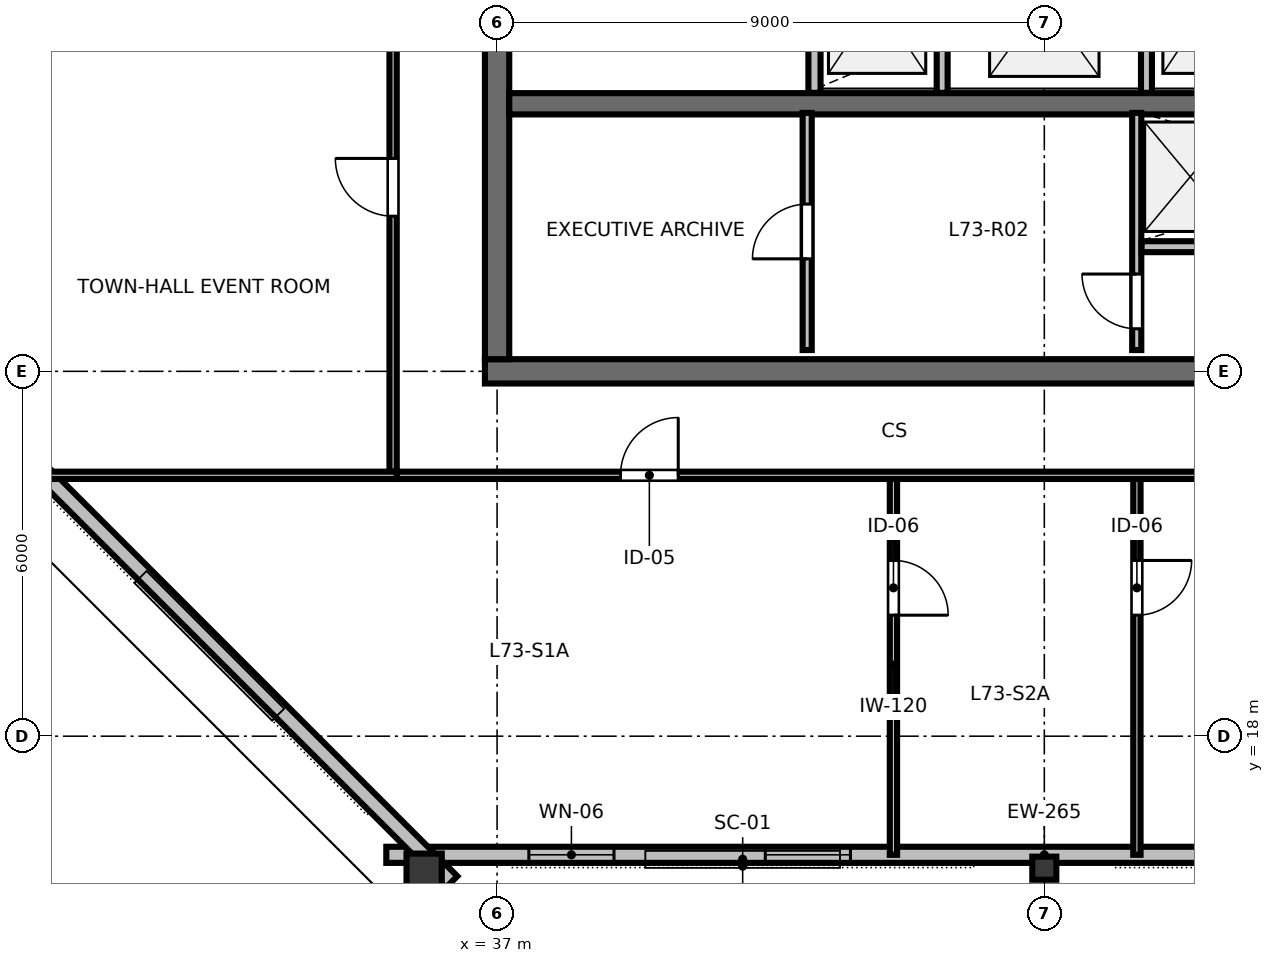
"""IFC4 building model, lengths in metres.
Left out: names, types, materials, properties, quantities, classifications, styles, units other than length and angle.
Written with IfcOpenShell. Run it as: python <this file> out.ifc"""

import sys

from ifc_helpers import new_model, si_unit, direction, frame, frame_2d, origin, origin_2d, place, context, subcontext, project, spatial, rectangle, hollow_rectangle, i_section, extrude, element, fill, save


model = new_model("IFC4")
c1 = context("Model", 3, precision=1e-05, world=origin(), true_north=direction((0.0, 1.0)))
c2 = subcontext(c1, "Body", "Model", "MODEL_VIEW")
j1 = project(units=[si_unit("LENGTHUNIT", "METRE"), si_unit("PLANEANGLEUNIT", "RADIAN")], contexts=[c1])
p1 = place(None, origin())
s1 = spatial("IfcSite", under=j1, at=p1, CompositionType="ELEMENT")
p2 = place(p1, origin())
s2 = spatial("IfcBuilding", under=s1, at=p2, CompositionType="ELEMENT")
p3 = place(p2, frame((0.0, 0.0, 275.4)))
s3 = spatial("IfcBuildingStorey", under=s2, at=p3, CompositionType="ELEMENT", Elevation=275.4)
p4 = place(p3, frame((36.8, 24.0, 0.0), z_axis=(0.0, 0.0, 1.0), x_axis=(1.0, 0.0, 0.0)))
e1 = element("IfcWall", 1, at=p4, inside=s3, PredefinedType="SHEAR", context=c2, shape_type="SweptSolid", body=[
    extrude(rectangle(XDim=18.4, YDim=0.4, at=frame_2d((9.2, 0.0))), origin(), (0.0, 0.0, 1.0), 3.28),
])
p5 = place(p4, frame((13.4, 0.0, 0.0)))
e2 = element("IfcOpeningElement", 2, at=p5, cuts=e1, PredefinedType="OPENING", context=c2, shape_type="SweptSolid", body=[
    extrude(rectangle(XDim=1.6, YDim=2.15, at=frame_2d((0.8, 1.075))), frame((0.0, 0.21, 0.0), z_axis=(0.0, -1.0, 0.0), x_axis=(1.0, 0.0, 0.0)), (0.0, 0.0, 1.0), 0.42),
])
p6 = place(p3, frame((37.0, 24.2, 0.0), z_axis=(0.0, 0.0, 1.0), x_axis=(0.0, 1.0, 0.0)))
e3 = element("IfcWall", 3, at=p6, inside=s3, PredefinedType="SHEAR", context=c2, shape_type="SweptSolid", body=[
    extrude(rectangle(XDim=15.6, YDim=0.4, at=frame_2d((7.8, 0.0))), origin(), (0.0, 0.0, 1.0), 3.28),
])
p7 = place(p6, frame((5.325, 0.0, 0.0)))
e4 = element("IfcOpeningElement", 4, at=p7, cuts=e3, PredefinedType="OPENING", context=c2, shape_type="SweptSolid", body=[
    extrude(rectangle(XDim=1.15, YDim=2.15, at=frame_2d((0.575, 1.075))), frame((0.0, 0.21, 0.0), z_axis=(0.0, -1.0, 0.0), x_axis=(1.0, 0.0, 0.0)), (0.0, 0.0, 1.0), 0.42),
])
p8 = place(p3, frame((37.2, 28.4, 0.0), z_axis=(0.0, 0.0, 1.0), x_axis=(1.0, 0.0, 0.0)))
e5 = element("IfcWall", 5, at=p8, inside=s3, PredefinedType="SHEAR", context=c2, shape_type="SweptSolid", body=[
    extrude(rectangle(XDim=17.6, YDim=0.35, at=frame_2d((8.8, 0.0))), origin(), (0.0, 0.0, 1.0), 3.28),
])
p9 = place(p3, frame((35.8, 15.719, 0.0), z_axis=(0.143355432569, 0.089514056813, 0.985614759217), x_axis=(-0.529645364944, 0.848219185938, 0.0)))
e6 = element("IfcColumn", 6, at=p9, inside=s3, PredefinedType="COLUMN", context=c2, shape_type="SweptSolid", body=[
    extrude(hollow_rectangle(XDim=0.58, YDim=0.7, WallThickness=0.032, at=origin_2d()), origin(), (0.0, 0.0, 1.0), 3.306),
])
p10 = place(p3, frame((46.0, 15.829, 0.0), z_axis=(0.0, 0.088967639141, 0.996034517065), x_axis=(-1.0, 0.0, 0.0)))
e7 = element("IfcColumn", 7, at=p10, inside=s3, PredefinedType="COLUMN", context=c2, shape_type="SweptSolid", body=[
    extrude(i_section(OverallWidth=0.395, OverallDepth=0.38, WebThickness=0.019, FlangeThickness=0.03, FilletRadius=0.025, at=origin_2d()), origin(), (0.0, 0.0, 1.0), 3.271),
])
p11 = place(p3, frame((35.178, 16.049, 0.0), z_axis=(0.0, 0.0, 1.0), x_axis=(1.0, 0.0, 0.0)))
e8 = element("IfcWall", 8, at=p11, inside=s3, PredefinedType="STANDARD", context=c2, shape_type="SweptSolid", body=[
    extrude(rectangle(XDim=21.644, YDim=0.265, at=frame_2d((10.822, 0.0))), origin(), (0.0, 0.0, 1.0), 2.717),
])
p12 = place(p11, frame((2.344, 0.0, 0.85)))
e9 = element("IfcOpeningElement", 9, at=p12, cuts=e8, PredefinedType="OPENING", context=c2, shape_type="SweptSolid", body=[
    extrude(rectangle(XDim=1.4, YDim=1.2, at=frame_2d((0.7, 0.6))), frame((0.0, 0.142, 0.0), z_axis=(0.0, -1.0, 0.0), x_axis=(1.0, 0.0, 0.0)), (0.0, 0.0, 1.0), 0.285),
])
p13 = place(p11, frame((6.233, 0.0, 0.85)))
e10 = element("IfcOpeningElement", 10, at=p13, cuts=e8, PredefinedType="OPENING", context=c2, shape_type="SweptSolid", body=[
    extrude(rectangle(XDim=1.4, YDim=1.2, at=frame_2d((0.7, 0.6))), frame((0.0, 0.142, 0.0), z_axis=(0.0, -1.0, 0.0), x_axis=(1.0, 0.0, 0.0)), (0.0, 0.0, 1.0), 0.285),
])
p14 = place(p11, frame((14.01, 0.0, 0.85)))
e11 = element("IfcOpeningElement", 11, at=p14, cuts=e8, PredefinedType="OPENING", context=c2, shape_type="SweptSolid", body=[
    extrude(rectangle(XDim=1.4, YDim=1.2, at=frame_2d((0.7, 0.6))), frame((0.0, 0.142, 0.0), z_axis=(0.0, -1.0, 0.0), x_axis=(1.0, 0.0, 0.0)), (0.0, 0.0, 1.0), 0.285),
])
p15 = place(p11, frame((17.899, 0.0, 0.85)))
e12 = element("IfcOpeningElement", 12, at=p15, cuts=e8, PredefinedType="OPENING", context=c2, shape_type="SweptSolid", body=[
    extrude(rectangle(XDim=1.4, YDim=1.2, at=frame_2d((0.7, 0.6))), frame((0.0, 0.142, 0.0), z_axis=(0.0, -1.0, 0.0), x_axis=(1.0, 0.0, 0.0)), (0.0, 0.0, 1.0), 0.285),
])
p16 = place(p3, frame((28.386, 23.471, 0.0), z_axis=(0.0, 0.0, 1.0), x_axis=(0.707106781187, -0.707106781187, 0.0)))
e13 = element("IfcWall", 13, at=p16, inside=s3, PredefinedType="STANDARD", context=c2, shape_type="SweptSolid", body=[
    extrude(rectangle(XDim=11.125, YDim=0.265, at=frame_2d((5.562, 0.0))), origin(), (0.0, 0.0, 1.0), 2.717),
])
p17 = place(p3, frame((42.22, 28.58, 0.0), z_axis=(0.0, 0.0, 1.0), x_axis=(0.0, 1.0, 0.0)))
e14 = element("IfcWall", 14, at=p17, inside=s3, PredefinedType="PARTITIONING", context=c2, shape_type="SweptSolid", body=[
    extrude(rectangle(XDim=3.04, YDim=0.2, at=frame_2d((1.52, 0.0))), origin(), (0.0, 0.0, 1.0), 3.26),
])
p18 = place(p17, frame((0.95, 0.0, 0.0)))
e15 = element("IfcOpeningElement", 15, at=p18, cuts=e14, PredefinedType="OPENING", context=c2, shape_type="SweptSolid", body=[
    extrude(rectangle(XDim=1.05, YDim=2.15, at=frame_2d((0.525, 1.075))), frame((0.0, 0.11, 0.0), z_axis=(0.0, -1.0, 0.0), x_axis=(1.0, 0.0, 0.0)), (0.0, 0.0, 1.0), 0.22),
])
for number, where, z_axis, x_axis in (
    (16, (44.32, 28.58, 0.0), (0.0, 0.0, 1.0), (0.0, 1.0, 0.0)),
    (17, (47.68, 28.58, 0.0), (0.0, 0.0, 1.0), (0.0, 1.0, 0.0)),
):
    element("IfcWall", number, at=place(p3, frame(where, z_axis=z_axis, x_axis=x_axis)), inside=s3, PredefinedType="PARTITIONING", context=c2, shape_type="SweptSolid", body=[
        extrude(rectangle(XDim=3.04, YDim=0.18, at=frame_2d((1.52, 0.0))), origin(), (0.0, 0.0, 1.0), 3.26),
    ])
p19 = place(p3, frame((42.1, 24.35, 0.0), z_axis=(0.0, 0.0, 1.0), x_axis=(0.0, 1.0, 0.0)))
e18 = element("IfcWall", 18, at=p19, inside=s3, PredefinedType="PARTITIONING", context=c2, shape_type="SweptSolid", body=[
    extrude(rectangle(XDim=3.9, YDim=0.15, at=frame_2d((1.95, 0.0))), origin(), (0.0, 0.0, 1.0), 3.26),
])
p20 = place(p19, frame((1.5, 0.0, 0.0)))
e19 = element("IfcOpeningElement", 19, at=p20, cuts=e18, PredefinedType="OPENING", context=c2, shape_type="SweptSolid", body=[
    extrude(rectangle(XDim=0.9, YDim=2.15, at=frame_2d((0.45, 1.075))), frame((0.0, 0.085, 0.0), z_axis=(0.0, -1.0, 0.0), x_axis=(1.0, 0.0, 0.0)), (0.0, 0.0, 1.0), 0.17),
])
p21 = place(p3, frame((47.52, 24.35, 0.0), z_axis=(0.0, 0.0, 1.0), x_axis=(0.0, 1.0, 0.0)))
e20 = element("IfcWall", 20, at=p21, inside=s3, PredefinedType="PARTITIONING", context=c2, shape_type="SweptSolid", body=[
    extrude(rectangle(XDim=3.9, YDim=0.15, at=frame_2d((1.95, 0.0))), origin(), (0.0, 0.0, 1.0), 3.26),
])
p22 = place(p21, frame((0.35, 0.0, 0.0)))
e21 = element("IfcOpeningElement", 21, at=p22, cuts=e20, PredefinedType="OPENING", context=c2, shape_type="SweptSolid", body=[
    extrude(rectangle(XDim=0.9, YDim=2.15, at=frame_2d((0.45, 1.075))), frame((0.0, 0.085, 0.0), z_axis=(0.0, -1.0, 0.0), x_axis=(1.0, 0.0, 0.0)), (0.0, 0.0, 1.0), 0.17),
])
p23 = place(p3, frame((47.6, 26.05, 0.0), z_axis=(0.0, 0.0, 1.0), x_axis=(1.0, 0.0, 0.0)))
e22 = element("IfcWall", 22, at=p23, inside=s3, PredefinedType="PARTITIONING", context=c2, shape_type="SweptSolid", body=[
    extrude(rectangle(XDim=7.0, YDim=0.18, at=frame_2d((3.5, 0.0))), origin(), (0.0, 0.0, 1.0), 3.26),
])
p24 = place(p23, frame((1.2, 0.0, 0.0)))
e23 = element("IfcOpeningElement", 23, at=p24, cuts=e22, PredefinedType="OPENING", context=c2, shape_type="SweptSolid", body=[
    extrude(rectangle(XDim=1.05, YDim=2.15, at=frame_2d((0.525, 1.075))), frame((0.0, 0.1, 0.0), z_axis=(0.0, -1.0, 0.0), x_axis=(1.0, 0.0, 0.0)), (0.0, 0.0, 1.0), 0.2),
])
p25 = place(p23, frame((3.4, 0.0, 0.0)))
e24 = element("IfcOpeningElement", 24, at=p25, cuts=e22, PredefinedType="OPENING", context=c2, shape_type="SweptSolid", body=[
    extrude(rectangle(XDim=1.05, YDim=2.15, at=frame_2d((0.525, 1.075))), frame((0.0, 0.1, 0.0), z_axis=(0.0, -1.0, 0.0), x_axis=(1.0, 0.0, 0.0)), (0.0, 0.0, 1.0), 0.2),
])
p26 = place(p3, frame((43.519, 22.29, 0.0), z_axis=(0.0, 0.0, 1.0), x_axis=(0.0, -1.0, 0.0)))
e25 = element("IfcWall", 25, at=p26, inside=s3, PredefinedType="PARTITIONING", context=c2, shape_type="SweptSolid", body=[
    extrude(rectangle(XDim=6.241, YDim=0.12, at=frame_2d((3.121, 0.0))), origin(), (0.0, 0.0, 1.0), 2.54),
])
p27 = place(p26, frame((1.4, 0.0, 0.0)))
e26 = element("IfcOpeningElement", 26, at=p27, cuts=e25, PredefinedType="OPENING", context=c2, shape_type="SweptSolid", body=[
    extrude(rectangle(XDim=0.9, YDim=2.15, at=frame_2d((0.45, 1.075))), frame((0.0, 0.07, 0.0), z_axis=(0.0, -1.0, 0.0), x_axis=(1.0, 0.0, 0.0)), (0.0, 0.0, 1.0), 0.14),
])
p28 = place(p3, frame((47.523, 22.29, 0.0), z_axis=(0.0, 0.0, 1.0), x_axis=(0.0, -1.0, 0.0)))
e27 = element("IfcWall", 27, at=p28, inside=s3, PredefinedType="PARTITIONING", context=c2, shape_type="SweptSolid", body=[
    extrude(rectangle(XDim=6.241, YDim=0.12, at=frame_2d((3.121, 0.0))), origin(), (0.0, 0.0, 1.0), 2.54),
])
p29 = place(p28, frame((1.4, 0.0, 0.0)))
e28 = element("IfcOpeningElement", 28, at=p29, cuts=e27, PredefinedType="OPENING", context=c2, shape_type="SweptSolid", body=[
    extrude(rectangle(XDim=0.9, YDim=2.15, at=frame_2d((0.45, 1.075))), frame((0.0, 0.07, 0.0), z_axis=(0.0, -1.0, 0.0), x_axis=(1.0, 0.0, 0.0)), (0.0, 0.0, 1.0), 0.14),
])
p30 = place(p3, frame((35.35, 22.29, 0.0), z_axis=(0.0, 0.0, 1.0), x_axis=(1.0, 0.0, 0.0)))
e29 = element("IfcWall", 29, at=p30, inside=s3, PredefinedType="PARTITIONING", context=c2, shape_type="SweptSolid", body=[
    extrude(rectangle(XDim=21.3, YDim=0.12, at=frame_2d((10.65, 0.0))), origin(), (0.0, 0.0, 1.0), 2.54),
])
p31 = place(p30, frame((3.679, 0.0, 0.0)))
e30 = element("IfcOpeningElement", 30, at=p31, cuts=e29, PredefinedType="OPENING", context=c2, shape_type="SweptSolid", body=[
    extrude(rectangle(XDim=0.95, YDim=2.15, at=frame_2d((0.475, 1.075))), frame((0.0, 0.07, 0.0), z_axis=(0.0, -1.0, 0.0), x_axis=(1.0, 0.0, 0.0)), (0.0, 0.0, 1.0), 0.14),
])
p32 = place(p30, frame((16.191, 0.0, 0.0)))
e31 = element("IfcOpeningElement", 31, at=p32, cuts=e29, PredefinedType="OPENING", context=c2, shape_type="SweptSolid", body=[
    extrude(rectangle(XDim=0.95, YDim=2.15, at=frame_2d((0.475, 1.075))), frame((0.0, 0.07, 0.0), z_axis=(0.0, -1.0, 0.0), x_axis=(1.0, 0.0, 0.0)), (0.0, 0.0, 1.0), 0.14),
])
p33 = place(p3, frame((35.29, 22.35, 0.0), z_axis=(0.0, 0.0, 1.0), x_axis=(0.0, 1.0, 0.0)))
e32 = element("IfcWall", 32, at=p33, inside=s3, PredefinedType="PARTITIONING", context=c2, shape_type="SweptSolid", body=[
    extrude(rectangle(XDim=19.3, YDim=0.12, at=frame_2d((9.65, 0.0))), origin(), (0.0, 0.0, 1.0), 2.54),
])
p34 = place(p33, frame((4.201, 0.0, 0.0)))
e33 = element("IfcOpeningElement", 33, at=p34, cuts=e32, PredefinedType="OPENING", context=c2, shape_type="SweptSolid", body=[
    extrude(rectangle(XDim=0.95, YDim=2.15, at=frame_2d((0.475, 1.075))), frame((0.0, 0.07, 0.0), z_axis=(0.0, -1.0, 0.0), x_axis=(1.0, 0.0, 0.0)), (0.0, 0.0, 1.0), 0.14),
])
p35 = place(p33, frame((13.651, 0.0, 0.0)))
e34 = element("IfcOpeningElement", 34, at=p35, cuts=e32, PredefinedType="OPENING", context=c2, shape_type="SweptSolid", body=[
    extrude(rectangle(XDim=0.95, YDim=2.15, at=frame_2d((0.475, 1.075))), frame((0.0, 0.07, 0.0), z_axis=(0.0, -1.0, 0.0), x_axis=(1.0, 0.0, 0.0)), (0.0, 0.0, 1.0), 0.14),
])
p36 = place(p3, frame((35.35, 22.29, 0.0), z_axis=(0.0, 0.0, 1.0), x_axis=(-1.0, 0.0, 0.0)))
e35 = element("IfcWall", 35, at=p36, inside=s3, PredefinedType="PARTITIONING", context=c2, shape_type="SweptSolid", body=[
    extrude(rectangle(XDim=5.783, YDim=0.12, at=frame_2d((2.892, 0.0))), origin(), (0.0, 0.0, 1.0), 2.54),
])
p37 = place(p12, origin())
e36 = element("IfcWindow", 36, at=p37, inside=s3, PartitioningType="SINGLE_PANEL", PredefinedType="WINDOW", context=c2, shape_type="SweptSolid", body=[
    extrude(rectangle(XDim=1.4, YDim=1.2, at=frame_2d((0.7, 0.6))), frame((0.0, 0.03, 0.0), z_axis=(0.0, -1.0, 0.0), x_axis=(1.0, 0.0, 0.0)), (0.0, 0.0, 1.0), 0.06),
])
fill(e9, e36)
p38 = place(p13, origin())
e37 = element("IfcWindow", 37, at=p38, inside=s3, PartitioningType="SINGLE_PANEL", PredefinedType="WINDOW", context=c2, shape_type="SweptSolid", body=[
    extrude(rectangle(XDim=1.4, YDim=1.2, at=frame_2d((0.7, 0.6))), frame((0.0, 0.03, 0.0), z_axis=(0.0, -1.0, 0.0), x_axis=(1.0, 0.0, 0.0)), (0.0, 0.0, 1.0), 0.06),
])
fill(e10, e37)
p39 = place(p20, origin())
e38 = element("IfcDoor", 38, at=p39, inside=s3, OperationType="SINGLE_SWING_LEFT", PredefinedType="DOOR", context=c2, shape_type="SweptSolid", body=[
    extrude(rectangle(XDim=0.9, YDim=2.15, at=frame_2d((0.45, 1.075))), frame((0.0, 0.025, 0.0), z_axis=(0.0, -1.0, 0.0), x_axis=(1.0, 0.0, 0.0)), (0.0, 0.0, 1.0), 0.05),
])
fill(e19, e38)
p40 = place(p22, origin())
e39 = element("IfcDoor", 39, at=p40, inside=s3, OperationType="SINGLE_SWING_RIGHT", PredefinedType="DOOR", context=c2, shape_type="SweptSolid", body=[
    extrude(rectangle(XDim=0.9, YDim=2.15, at=frame_2d((0.45, 1.075))), frame((0.0, 0.025, 0.0), z_axis=(0.0, -1.0, 0.0), x_axis=(1.0, 0.0, 0.0)), (0.0, 0.0, 1.0), 0.05),
])
fill(e21, e39)
p41 = place(p27, origin())
e40 = element("IfcDoor", 40, at=p41, inside=s3, OperationType="SINGLE_SWING_RIGHT", PredefinedType="DOOR", context=c2, shape_type="SweptSolid", body=[
    extrude(rectangle(XDim=0.9, YDim=2.15, at=frame_2d((0.45, 1.075))), frame((0.0, 0.025, 0.0), z_axis=(0.0, -1.0, 0.0), x_axis=(1.0, 0.0, 0.0)), (0.0, 0.0, 1.0), 0.05),
])
fill(e26, e40)
p42 = place(p29, origin())
e41 = element("IfcDoor", 41, at=p42, inside=s3, OperationType="SINGLE_SWING_LEFT", PredefinedType="DOOR", context=c2, shape_type="SweptSolid", body=[
    extrude(rectangle(XDim=0.9, YDim=2.15, at=frame_2d((0.45, 1.075))), frame((0.0, 0.025, 0.0), z_axis=(0.0, -1.0, 0.0), x_axis=(1.0, 0.0, 0.0)), (0.0, 0.0, 1.0), 0.05),
])
fill(e28, e41)
p43 = place(p31, origin())
e42 = element("IfcDoor", 42, at=p43, inside=s3, OperationType="SINGLE_SWING_RIGHT", PredefinedType="DOOR", context=c2, shape_type="SweptSolid", body=[
    extrude(rectangle(XDim=0.95, YDim=2.15, at=frame_2d((0.475, 1.075))), frame((0.0, 0.025, 0.0), z_axis=(0.0, -1.0, 0.0), x_axis=(1.0, 0.0, 0.0)), (0.0, 0.0, 1.0), 0.05),
])
fill(e30, e42)
p44 = place(p34, origin())
e43 = element("IfcDoor", 43, at=p44, inside=s3, OperationType="SINGLE_SWING_RIGHT", PredefinedType="DOOR", context=c2, shape_type="SweptSolid", body=[
    extrude(rectangle(XDim=0.95, YDim=2.15, at=frame_2d((0.475, 1.075))), frame((0.0, 0.025, 0.0), z_axis=(0.0, -1.0, 0.0), x_axis=(1.0, 0.0, 0.0)), (0.0, 0.0, 1.0), 0.05),
])
fill(e33, e43)
save(model, sys.argv[1])
